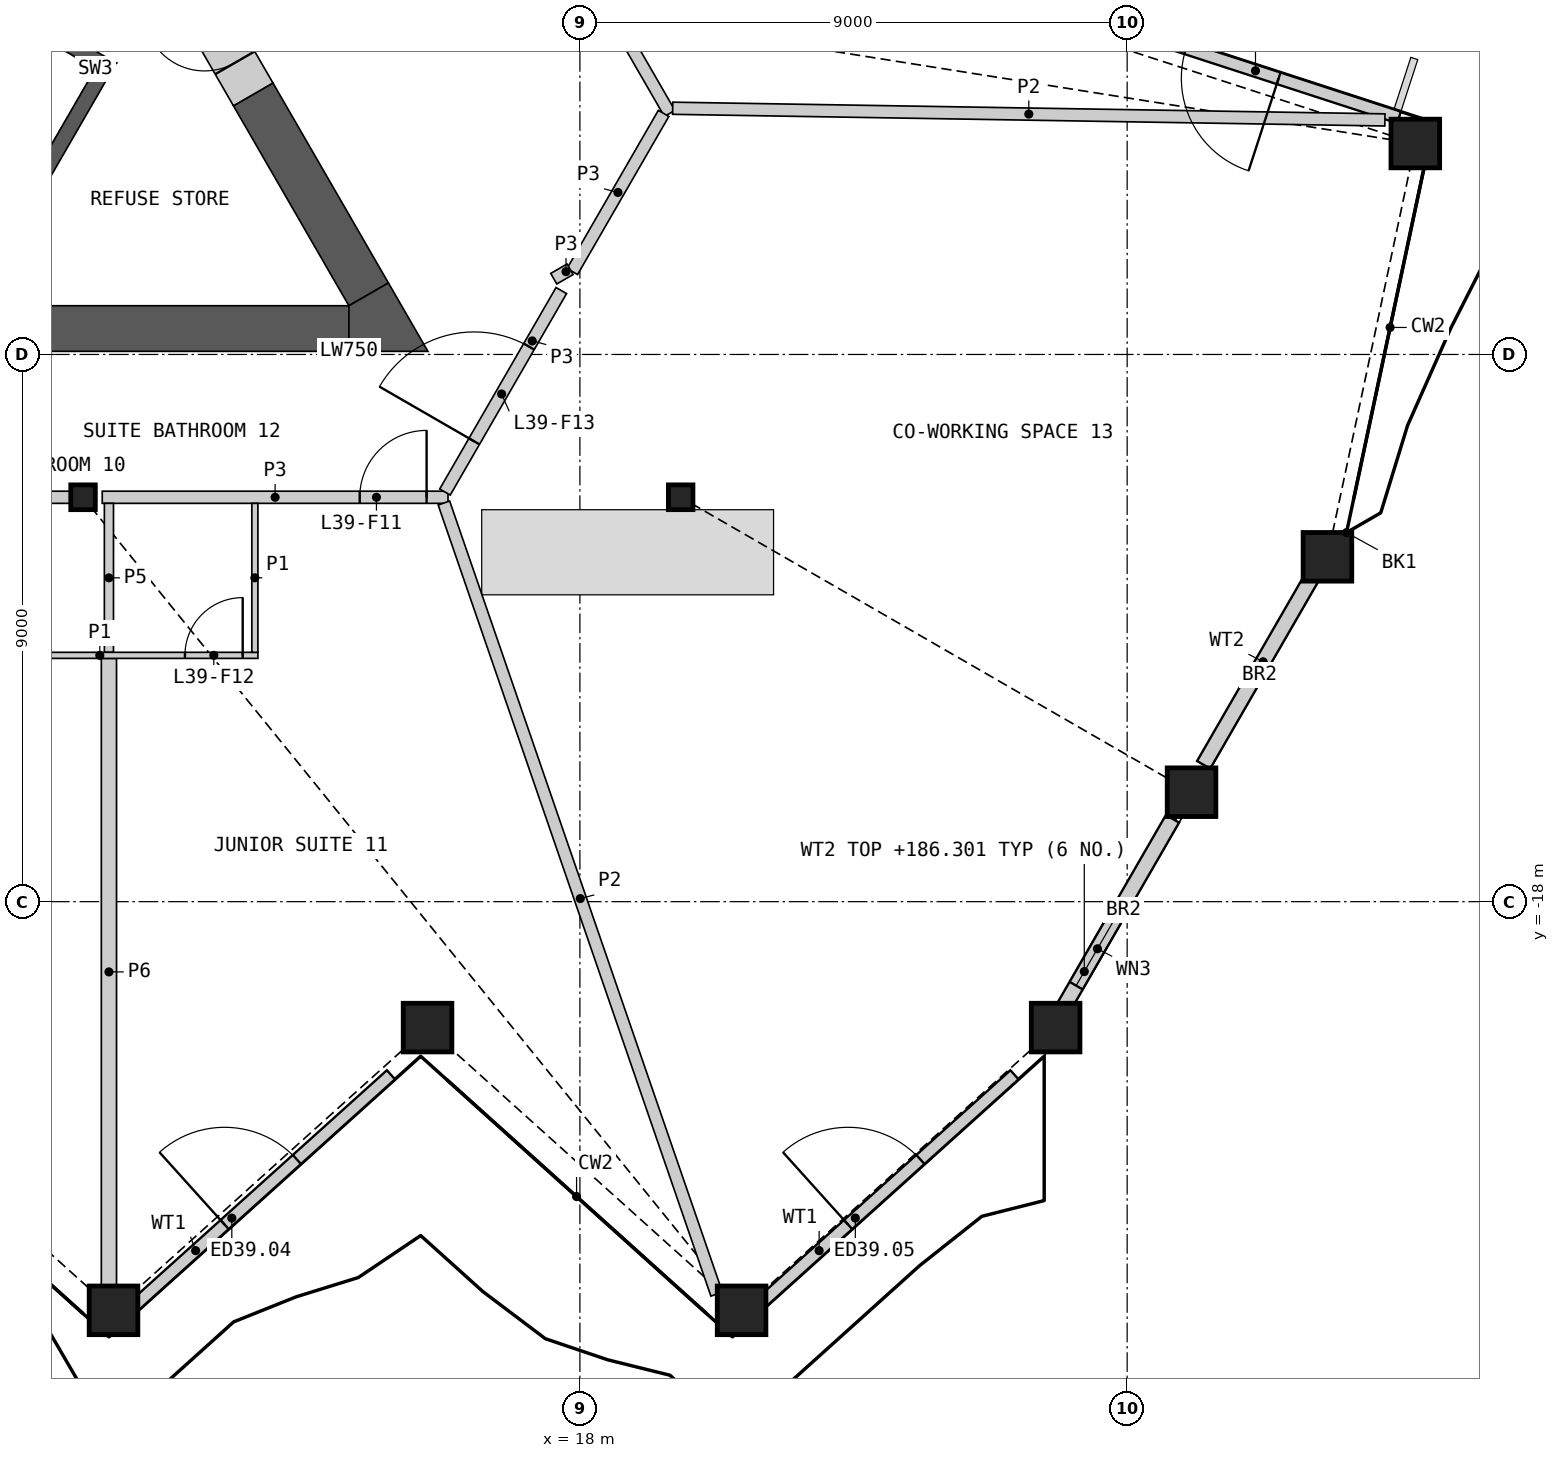
"""IFC4 building model, lengths in metres.
Left out: names, types, materials, properties, quantities, classifications, styles, units other than length and angle.
Written with IfcOpenShell. Run it as: python <this file> out.ifc"""

import sys

from ifc_helpers import new_model, si_unit, direction, frame, frame_2d, origin, origin_2d, place, context, subcontext, project, spatial, polyline, rectangle, hollow_rectangle, i_section, outline, extrude, element, fill, save


model = new_model("IFC4")
c1 = context("Model", 3, precision=1e-05, world=origin(), true_north=direction((0.0, 1.0)))
c2 = subcontext(c1, "Body", "Model", "MODEL_VIEW")
j1 = project(units=[si_unit("LENGTHUNIT", "METRE"), si_unit("PLANEANGLEUNIT", "RADIAN")], contexts=[c1])
p1 = place(None, origin())
s1 = spatial("IfcSite", under=j1, at=p1, CompositionType="ELEMENT")
p2 = place(p1, origin())
s2 = spatial("IfcBuilding", under=s1, at=p2, CompositionType="ELEMENT")
p3 = place(p2, frame((0.0, 0.0, 183.6)))
s3 = spatial("IfcBuildingStorey", under=s2, at=p3, CompositionType="ELEMENT", Elevation=183.6)
for number, where, z_axis, x_axis in (
    (1, (10.329, -24.722, 0.0), (0.0, 0.0, 1.0), (1.0, 0.0, 0.0)),
    (2, (15.494, -20.071, 0.0), (0.0, 0.0, 1.0), (1.0, 0.0, 0.0)),
    (3, (20.659, -24.722, 0.0), (0.0, 0.0, 1.0), (1.0, 0.0, 0.0)),
    (4, (25.823, -20.071, 0.0), (0.0, 0.0, 1.0), (1.0, 0.0, 0.0)),
    (5, (28.059, -16.2, 0.0), (0.0, 0.0, 1.0), (1.0, 0.0, 0.0)),
    (6, (30.294, -12.328, 0.0), (0.0, 0.0, 1.0), (1.0, 0.0, 0.0)),
    (7, (31.739, -5.53, 0.0), (0.0, 0.0, 1.0), (1.0, 0.0, 0.0)),
):
    element("IfcColumn", number, at=place(p3, frame(where, z_axis=z_axis, x_axis=x_axis)), inside=s3, PredefinedType="COLUMN", context=c2, shape_type="SweptSolid", body=[
        extrude(hollow_rectangle(XDim=0.8, YDim=0.8, WallThickness=0.05, at=origin_2d()), origin(), (0.0, 0.0, 1.0), 3.6),
    ])
for number, where, z_axis, x_axis in (
    (8, (9.828, -11.349, 0.0), (0.0, 0.0, 1.0), (1.0, 0.0, 0.0)),
    (9, (19.657, -11.349, 0.0), (0.0, 0.0, 1.0), (1.0, 0.0, 0.0)),
):
    element("IfcColumn", number, at=place(p3, frame(where, z_axis=z_axis, x_axis=x_axis)), inside=s3, PredefinedType="COLUMN", context=c2, shape_type="SweptSolid", body=[
        extrude(i_section(OverallWidth=0.404, OverallDepth=0.407, WebThickness=0.027, FlangeThickness=0.044, at=origin_2d()), origin(), (0.0, 0.0, 1.0), 3.6),
    ])
p4 = place(p3, frame((10.609, -24.704, 0.0), z_axis=(0.0, 0.0, 1.0), x_axis=(0.743140362926, 0.669135562491, 0.0)))
e10 = element("IfcWall", 10, at=p4, inside=s3, PredefinedType="SOLIDWALL", context=c2, shape_type="SweptSolid", body=[
    extrude(rectangle(XDim=5.763, YDim=0.2, at=frame_2d((2.882, 0.0))), origin(), (0.0, 0.0, 1.0), 2.701),
])
p5 = place(p4, frame((2.082, 0.0, 0.0)))
e11 = element("IfcOpeningElement", 11, at=p5, cuts=e10, PredefinedType="OPENING", context=c2, shape_type="SweptSolid", body=[
    extrude(rectangle(XDim=1.6, YDim=2.4, at=frame_2d((0.8, 1.2))), frame((0.0, 0.11, 0.0), z_axis=(0.0, -1.0, 0.0), x_axis=(1.0, 0.0, 0.0)), (0.0, 0.0, 1.0), 0.22),
])
p6 = place(p3, frame((20.864, -24.704, 0.0), z_axis=(0.0, 0.0, 1.0), x_axis=(0.743140362926, 0.669135562491, 0.0)))
e12 = element("IfcWall", 12, at=p6, inside=s3, PredefinedType="SOLIDWALL", context=c2, shape_type="SweptSolid", body=[
    extrude(rectangle(XDim=5.763, YDim=0.2, at=frame_2d((2.882, 0.0))), origin(), (0.0, 0.0, 1.0), 2.701),
])
p7 = place(p6, frame((2.082, 0.0, 0.0)))
e13 = element("IfcOpeningElement", 13, at=p7, cuts=e12, PredefinedType="OPENING", context=c2, shape_type="SweptSolid", body=[
    extrude(rectangle(XDim=1.6, YDim=2.4, at=frame_2d((0.8, 1.2))), frame((0.0, 0.11, 0.0), z_axis=(0.0, -1.0, 0.0), x_axis=(1.0, 0.0, 0.0)), (0.0, 0.0, 1.0), 0.22),
])
p8 = place(p3, frame((25.811, -19.987, 0.0), z_axis=(0.0, 0.0, 1.0), x_axis=(0.499981047344, 0.866036345829, 0.0)))
e14 = element("IfcWall", 14, at=p8, inside=s3, PredefinedType="SOLIDWALL", context=c2, shape_type="SweptSolid", body=[
    extrude(rectangle(XDim=3.868, YDim=0.25, at=frame_2d((1.934, 0.0))), origin(), (0.0, 0.0, 1.0), 2.701),
])
p9 = place(p8, frame((0.7, 0.0, 1.7)))
e15 = element("IfcOpeningElement", 15, at=p9, cuts=e14, PredefinedType="OPENING", context=c2, shape_type="SweptSolid", body=[
    extrude(rectangle(XDim=1.4, YDim=0.8, at=frame_2d((0.7, 0.4))), frame((0.0, 0.135, 0.0), z_axis=(0.0, -1.0, 0.0), x_axis=(1.0, 0.0, 0.0)), (0.0, 0.0, 1.0), 0.27),
])
p10 = place(p3, frame((28.258, -15.75, 0.0), z_axis=(0.0, 0.0, 1.0), x_axis=(0.499995984904, 0.866027721889, 0.0)))
e16 = element("IfcWall", 16, at=p10, inside=s3, PredefinedType="SOLIDWALL", context=c2, shape_type="SweptSolid", body=[
    extrude(rectangle(XDim=3.915, YDim=0.25, at=frame_2d((1.957, 0.0))), origin(), (0.0, 0.0, 1.0), 2.701),
])
p11 = place(p3, frame((31.471, -5.101, 0.0), z_axis=(0.0, 0.0, 1.0), x_axis=(-0.951053678976, 0.30902572661, 0.0)))
e17 = element("IfcWall", 17, at=p11, inside=s3, PredefinedType="SOLIDWALL", context=c2, shape_type="SweptSolid", body=[
    extrude(rectangle(XDim=5.763, YDim=0.2, at=frame_2d((2.882, 0.0))), origin(), (0.0, 0.0, 1.0), 2.701),
])
p12 = place(p11, frame((2.082, 0.0, 0.0)))
e18 = element("IfcOpeningElement", 18, at=p12, cuts=e17, PredefinedType="OPENING", context=c2, shape_type="SweptSolid", body=[
    extrude(rectangle(XDim=1.6, YDim=2.4, at=frame_2d((0.8, 1.2))), frame((0.0, 0.11, 0.0), z_axis=(0.0, -1.0, 0.0), x_axis=(1.0, 0.0, 0.0)), (0.0, 0.0, 1.0), 0.22),
])
p13 = place(p3, origin())
e19 = element("IfcWall", 19, at=p13, inside=s3, PredefinedType="SHEAR", context=c2, shape_type="SweptSolid", body=[
    extrude(outline(polyline([(8.83, -6.881), (10.374, -4.206), (10.032, -4.298), (8.738, -6.539), (8.83, -6.881)])), origin(), (0.0, 0.0, 1.0), 3.25),
])
p14 = place(p3, origin())
e20 = element("IfcWall", 20, at=p14, inside=s3, PredefinedType="SHEAR", context=c2, shape_type="SweptSolid", body=[
    extrude(outline(polyline([(10.032, -4.298), (10.374, -4.206), (5.307, -1.281), (5.182, -1.498), (10.032, -4.298)])), origin(), (0.0, 0.0, 1.0), 3.25),
])
p15 = place(p3, frame((4.48, -8.574, 0.0), z_axis=(0.0, 0.0, 1.0), x_axis=(1.0, 0.0, 0.0)))
e21 = element("IfcWall", 21, at=p15, inside=s3, PredefinedType="SHEAR", context=c2, shape_type="SweptSolid", body=[
    extrude(rectangle(XDim=9.721, YDim=0.75, at=frame_2d((4.86, 0.0))), origin(), (0.0, 0.0, 1.0), 3.25),
])
p16 = place(p3, frame((14.526, -8.011, 0.0), z_axis=(0.0, 0.0, 1.0), x_axis=(-0.499996970966, 0.866027152591, 0.0)))
e22 = element("IfcWall", 22, at=p16, inside=s3, PredefinedType="SHEAR", context=c2, shape_type="SweptSolid", body=[
    extrude(rectangle(XDim=3.798, YDim=0.75, at=frame_2d((1.899, 0.0))), origin(), (0.0, 0.0, 1.0), 3.25),
])
p17 = place(p3, origin())
e23 = element("IfcWall", 23, at=p17, inside=s3, PredefinedType="SHEAR", context=c2, shape_type="SweptSolid", body=[
    extrude(outline(polyline([(14.201, -8.949), (14.201, -8.199), (14.851, -7.824), (15.5, -8.949), (14.201, -8.949)])), origin(), (0.0, 0.0, 1.0), 3.25),
])
p18 = place(p3, frame((12.627, -4.722, 0.0), z_axis=(0.0, 0.0, 1.0), x_axis=(-0.499946605688, 0.86605622881, 0.0)))
e24 = element("IfcWall", 24, at=p18, inside=s3, PredefinedType="SHEAR", context=c2, shape_type="SweptSolid", body=[
    extrude(rectangle(XDim=2.2, YDim=0.75, at=frame_2d((1.1, 0.0))), origin(), (0.0, 0.0, 1.0), 3.25),
])
p19 = place(p18, frame((0.6, 0.0, 0.0)))
e25 = element("IfcOpeningElement", 25, at=p19, cuts=e24, PredefinedType="OPENING", context=c2, shape_type="SweptSolid", body=[
    extrude(rectangle(XDim=1.0, YDim=2.1, at=frame_2d((0.5, 1.05))), frame((0.0, 0.385, 0.0), z_axis=(0.0, -1.0, 0.0), x_axis=(1.0, 0.0, 0.0)), (0.0, 0.0, 1.0), 0.77),
])
p20 = place(p3, frame((5.377, 19.385, 0.0), z_axis=(0.0, 0.0, 1.0), x_axis=(0.500000757641, -0.86602496636, 0.0)))
e26 = element("IfcWall", 26, at=p20, inside=s3, PredefinedType="PARTITIONING", context=c2, shape_type="SweptSolid", body=[
    extrude(rectangle(XDim=28.198, YDim=0.2, at=frame_2d((14.099, 0.0))), origin(), (0.0, 0.0, 1.0), 3.25),
])
p21 = place(p20, frame((22.735, 0.0, 0.0)))
e27 = element("IfcOpeningElement", 27, at=p21, cuts=e26, PredefinedType="OPENING", context=c2, shape_type="SweptSolid", body=[
    extrude(rectangle(XDim=1.8, YDim=2.1, at=frame_2d((0.9, 1.05))), frame((0.0, 0.11, 0.0), z_axis=(0.0, -1.0, 0.0), x_axis=(1.0, 0.0, 0.0)), (0.0, 0.0, 1.0), 0.22),
])
p22 = place(p20, frame((14.402, 0.0, 0.0)))
e28 = element("IfcOpeningElement", 28, at=p22, cuts=e26, PredefinedType="OPENING", context=c2, shape_type="SweptSolid", body=[
    extrude(rectangle(XDim=1.0, YDim=2.1, at=frame_2d((0.5, 1.05))), frame((0.0, 0.11, 0.0), z_axis=(0.0, -1.0, 0.0), x_axis=(1.0, 0.0, 0.0)), (0.0, 0.0, 1.0), 0.22),
])
p23 = place(p20, frame((12.796, 0.0, 0.0)))
e29 = element("IfcOpeningElement", 29, at=p23, cuts=e26, PredefinedType="OPENING", context=c2, shape_type="SweptSolid", body=[
    extrude(rectangle(XDim=1.0, YDim=2.1, at=frame_2d((0.5, 1.05))), frame((0.0, 0.11, 0.0), z_axis=(0.0, -1.0, 0.0), x_axis=(1.0, 0.0, 0.0)), (0.0, 0.0, 1.0), 0.22),
])
p24 = place(p20, frame((4.164, 0.0, 0.0)))
e30 = element("IfcOpeningElement", 30, at=p24, cuts=e26, PredefinedType="OPENING", context=c2, shape_type="SweptSolid", body=[
    extrude(rectangle(XDim=1.0, YDim=2.1, at=frame_2d((0.5, 1.05))), frame((0.0, 0.11, 0.0), z_axis=(0.0, -1.0, 0.0), x_axis=(1.0, 0.0, 0.0)), (0.0, 0.0, 1.0), 0.22),
])
p25 = place(p20, frame((1.452, 0.0, 0.0)))
e31 = element("IfcOpeningElement", 31, at=p25, cuts=e26, PredefinedType="OPENING", context=c2, shape_type="SweptSolid", body=[
    extrude(rectangle(XDim=0.95, YDim=2.1, at=frame_2d((0.475, 1.05))), frame((0.0, 0.11, 0.0), z_axis=(0.0, -1.0, 0.0), x_axis=(1.0, 0.0, 0.0)), (0.0, 0.0, 1.0), 0.22),
])
p26 = place(p3, frame((10.254, -24.312, 0.0), z_axis=(0.0, 0.0, 1.0), x_axis=(0.0, 1.0, 0.0)))
e32 = element("IfcWall", 32, at=p26, inside=s3, PredefinedType="PARTITIONING", context=c2, shape_type="SweptSolid", body=[
    extrude(rectangle(XDim=10.313, YDim=0.25, at=frame_2d((5.156, 0.0))), origin(), (0.0, 0.0, 1.0), 2.404),
])
p27 = place(p3, frame((0.214, -11.349, 0.0), z_axis=(0.0, 0.0, 1.0), x_axis=(1.0, 0.0, 0.0)))
e33 = element("IfcWall", 33, at=p27, inside=s3, PredefinedType="PARTITIONING", context=c2, shape_type="SweptSolid", body=[
    extrude(rectangle(XDim=9.401, YDim=0.2, at=frame_2d((4.701, 0.0))), origin(), (0.0, 0.0, 1.0), 3.25),
])
p28 = place(p27, frame((3.551, 0.0, 0.0)))
e34 = element("IfcOpeningElement", 34, at=p28, cuts=e33, PredefinedType="OPENING", context=c2, shape_type="SweptSolid", body=[
    extrude(rectangle(XDim=1.0, YDim=2.1, at=frame_2d((0.5, 1.05))), frame((0.0, 0.11, 0.0), z_axis=(0.0, -1.0, 0.0), x_axis=(1.0, 0.0, 0.0)), (0.0, 0.0, 1.0), 0.22),
])
p29 = place(p27, frame((5.251, 0.0, 0.0)))
e35 = element("IfcOpeningElement", 35, at=p29, cuts=e33, PredefinedType="OPENING", context=c2, shape_type="SweptSolid", body=[
    extrude(rectangle(XDim=1.0, YDim=2.1, at=frame_2d((0.5, 1.05))), frame((0.0, 0.11, 0.0), z_axis=(0.0, -1.0, 0.0), x_axis=(1.0, 0.0, 0.0)), (0.0, 0.0, 1.0), 0.22),
])
p30 = place(p3, frame((10.144, -11.349, 0.0), z_axis=(0.0, 0.0, 1.0), x_axis=(1.0, 0.0, 0.0)))
e36 = element("IfcWall", 36, at=p30, inside=s3, PredefinedType="PARTITIONING", context=c2, shape_type="SweptSolid", body=[
    extrude(rectangle(XDim=5.687, YDim=0.2, at=frame_2d((2.843, 0.0))), origin(), (0.0, 0.0, 1.0), 3.25),
])
p31 = place(p30, frame((4.235, 0.0, 0.0)))
e37 = element("IfcOpeningElement", 37, at=p31, cuts=e36, PredefinedType="OPENING", context=c2, shape_type="SweptSolid", body=[
    extrude(rectangle(XDim=1.1, YDim=2.1, at=frame_2d((0.55, 1.05))), frame((0.0, 0.11, 0.0), z_axis=(0.0, -1.0, 0.0), x_axis=(1.0, 0.0, 0.0)), (0.0, 0.0, 1.0), 0.22),
])
p32 = place(p3, frame((15.781, -11.262, 0.0), z_axis=(0.0, 0.0, 1.0), x_axis=(0.499989446428, 0.866031496806, 0.0)))
e38 = element("IfcWall", 38, at=p32, inside=s3, PredefinedType="PARTITIONING", context=c2, shape_type="SweptSolid", body=[
    extrude(rectangle(XDim=3.826, YDim=0.2, at=frame_2d((1.913, 0.0))), origin(), (0.0, 0.0, 1.0), 3.25),
])
p33 = place(p32, frame((0.962, 0.0, 0.0)))
e39 = element("IfcOpeningElement", 39, at=p33, cuts=e38, PredefinedType="OPENING", context=c2, shape_type="SweptSolid", body=[
    extrude(rectangle(XDim=1.8, YDim=2.1, at=frame_2d((0.9, 1.05))), frame((0.0, 0.11, 0.0), z_axis=(0.0, -1.0, 0.0), x_axis=(1.0, 0.0, 0.0)), (0.0, 0.0, 1.0), 0.22),
])
p34 = place(p3, frame((17.875, -7.635, 0.0), z_axis=(0.0, 0.0, 1.0), x_axis=(0.499952404951, 0.866052881055, 0.0)))
e40 = element("IfcWall", 40, at=p34, inside=s3, PredefinedType="PARTITIONING", context=c2, shape_type="SweptSolid", body=[
    extrude(rectangle(XDim=3.002, YDim=0.2, at=frame_2d((1.501, 0.0))), origin(), (0.0, 0.0, 1.0), 3.25),
])
p35 = place(p3, frame((17.57, -7.754, 0.0), z_axis=(0.0, 0.0, 1.0), x_axis=(0.866054481515, 0.499949632511, 0.0)))
e41 = element("IfcWall", 41, at=p35, inside=s3, PredefinedType="PARTITIONING", context=c2, shape_type="SweptSolid", body=[
    extrude(rectangle(XDim=0.31, YDim=0.2, at=frame_2d((0.155, 0.0))), origin(), (0.0, 0.0, 1.0), 3.25),
])
p36 = place(p3, frame((15.763, -11.444, 0.0), z_axis=(0.0, 0.0, 1.0), x_axis=(0.325902118519, -0.945403516571, 0.0)))
e42 = element("IfcWall", 42, at=p36, inside=s3, PredefinedType="PARTITIONING", context=c2, shape_type="SweptSolid", body=[
    extrude(rectangle(XDim=13.763, YDim=0.2, at=frame_2d((6.881, 0.0))), origin(), (0.0, 0.0, 1.0), 2.404),
])
p37 = place(p3, frame((19.526, -4.95, 0.0), z_axis=(0.0, 0.0, 1.0), x_axis=(0.99986514458, -0.016422321819, 0.0)))
e43 = element("IfcWall", 43, at=p37, inside=s3, PredefinedType="PARTITIONING", context=c2, shape_type="SweptSolid", body=[
    extrude(rectangle(XDim=11.715, YDim=0.2, at=frame_2d((5.857, 0.0))), origin(), (0.0, 0.0, 1.0), 2.404),
])
p38 = place(p3, frame((10.254, -13.899, 0.0), z_axis=(0.0, 0.0, 1.0), x_axis=(0.0, 1.0, 0.0)))
e44 = element("IfcWall", 44, at=p38, inside=s3, PredefinedType="PLUMBINGWALL", context=c2, shape_type="SweptSolid", body=[
    extrude(rectangle(XDim=2.45, YDim=0.15, at=frame_2d((1.225, 0.0))), origin(), (0.0, 0.0, 1.0), 2.404),
])
p39 = place(p3, frame((7.504, -13.949, 0.0), z_axis=(0.0, 0.0, 1.0), x_axis=(1.0, 0.0, 0.0)))
e45 = element("IfcWall", 45, at=p39, inside=s3, PredefinedType="PARTITIONING", context=c2, shape_type="SweptSolid", body=[
    extrude(rectangle(XDim=5.2, YDim=0.1, at=frame_2d((2.6, 0.0))), origin(), (0.0, 0.0, 1.0), 2.404),
])
p40 = place(p39, frame((0.25, 0.0, 0.0)))
e46 = element("IfcOpeningElement", 46, at=p40, cuts=e45, PredefinedType="OPENING", context=c2, shape_type="SweptSolid", body=[
    extrude(rectangle(XDim=0.95, YDim=2.1, at=frame_2d((0.475, 1.05))), frame((0.0, 0.06, 0.0), z_axis=(0.0, -1.0, 0.0), x_axis=(1.0, 0.0, 0.0)), (0.0, 0.0, 1.0), 0.12),
])
p41 = place(p39, frame((4.0, 0.0, 0.0)))
e47 = element("IfcOpeningElement", 47, at=p41, cuts=e45, PredefinedType="OPENING", context=c2, shape_type="SweptSolid", body=[
    extrude(rectangle(XDim=0.95, YDim=2.1, at=frame_2d((0.475, 1.05))), frame((0.0, 0.06, 0.0), z_axis=(0.0, -1.0, 0.0), x_axis=(1.0, 0.0, 0.0)), (0.0, 0.0, 1.0), 0.12),
])
p42 = place(p3, frame((12.654, -13.899, 0.0), z_axis=(0.0, 0.0, 1.0), x_axis=(0.0, 1.0, 0.0)))
e48 = element("IfcWall", 48, at=p42, inside=s3, PredefinedType="PARTITIONING", context=c2, shape_type="SweptSolid", body=[
    extrude(rectangle(XDim=2.45, YDim=0.1, at=frame_2d((1.225, 0.0))), origin(), (0.0, 0.0, 1.0), 2.404),
])
p43 = place(p5, origin())
e49 = element("IfcDoor", 49, at=p43, inside=s3, OperationType="DOUBLE_DOOR_SINGLE_SWING", PredefinedType="DOOR", context=c2, shape_type="SweptSolid", body=[
    extrude(rectangle(XDim=1.6, YDim=2.4, at=frame_2d((0.8, 1.2))), frame((0.0, 0.025, 0.0), z_axis=(0.0, -1.0, 0.0), x_axis=(1.0, 0.0, 0.0)), (0.0, 0.0, 1.0), 0.05),
])
fill(e11, e49)
p44 = place(p7, origin())
e50 = element("IfcDoor", 50, at=p44, inside=s3, OperationType="DOUBLE_DOOR_SINGLE_SWING", PredefinedType="DOOR", context=c2, shape_type="SweptSolid", body=[
    extrude(rectangle(XDim=1.6, YDim=2.4, at=frame_2d((0.8, 1.2))), frame((0.0, 0.025, 0.0), z_axis=(0.0, -1.0, 0.0), x_axis=(1.0, 0.0, 0.0)), (0.0, 0.0, 1.0), 0.05),
])
fill(e13, e50)
p45 = place(p9, origin())
e51 = element("IfcWindow", 51, at=p45, inside=s3, PartitioningType="SINGLE_PANEL", PredefinedType="WINDOW", context=c2, shape_type="SweptSolid", body=[
    extrude(rectangle(XDim=1.4, YDim=0.8, at=frame_2d((0.7, 0.4))), frame((0.0, 0.03, 0.0), z_axis=(0.0, -1.0, 0.0), x_axis=(1.0, 0.0, 0.0)), (0.0, 0.0, 1.0), 0.06),
])
fill(e15, e51)
p46 = place(p12, origin())
e52 = element("IfcDoor", 52, at=p46, inside=s3, OperationType="DOUBLE_DOOR_SINGLE_SWING", PredefinedType="DOOR", context=c2, shape_type="SweptSolid", body=[
    extrude(rectangle(XDim=1.6, YDim=2.4, at=frame_2d((0.8, 1.2))), frame((0.0, 0.025, 0.0), z_axis=(0.0, -1.0, 0.0), x_axis=(1.0, 0.0, 0.0)), (0.0, 0.0, 1.0), 0.05),
])
fill(e18, e52)
p47 = place(p19, origin())
e53 = element("IfcDoor", 53, at=p47, inside=s3, OperationType="SINGLE_SWING_RIGHT", PredefinedType="DOOR", context=c2, shape_type="SweptSolid", body=[
    extrude(rectangle(XDim=1.0, YDim=2.1, at=frame_2d((0.5, 1.05))), frame((0.0, 0.13, 0.0), z_axis=(0.0, -1.0, 0.0), x_axis=(1.0, 0.0, 0.0)), (0.0, 0.0, 1.0), 0.05),
])
fill(e25, e53)
p48 = place(p31, origin())
e54 = element("IfcDoor", 54, at=p48, inside=s3, OperationType="SINGLE_SWING_RIGHT", PredefinedType="DOOR", context=c2, shape_type="SweptSolid", body=[
    extrude(rectangle(XDim=1.1, YDim=2.1, at=frame_2d((0.55, 1.05))), frame((0.0, 0.025, 0.0), z_axis=(0.0, -1.0, 0.0), x_axis=(1.0, 0.0, 0.0)), (0.0, 0.0, 1.0), 0.05),
])
fill(e37, e54)
p49 = place(p41, origin())
e55 = element("IfcDoor", 55, at=p49, inside=s3, OperationType="SINGLE_SWING_RIGHT", PredefinedType="DOOR", context=c2, shape_type="SweptSolid", body=[
    extrude(rectangle(XDim=0.95, YDim=2.1, at=frame_2d((0.475, 1.05))), frame((0.0, 0.025, 0.0), z_axis=(0.0, -1.0, 0.0), x_axis=(1.0, 0.0, 0.0)), (0.0, 0.0, 1.0), 0.05),
])
fill(e47, e55)
p50 = place(p33, origin())
e56 = element("IfcDoor", 56, at=p50, inside=s3, OperationType="DOUBLE_DOOR_SINGLE_SWING", PredefinedType="DOOR", context=c2, shape_type="SweptSolid", body=[
    extrude(rectangle(XDim=1.8, YDim=2.1, at=frame_2d((0.9, 1.05))), frame((0.0, 0.025, 0.0), z_axis=(0.0, -1.0, 0.0), x_axis=(1.0, 0.0, 0.0)), (0.0, 0.0, 1.0), 0.05),
])
fill(e39, e56)
save(model, sys.argv[1])
